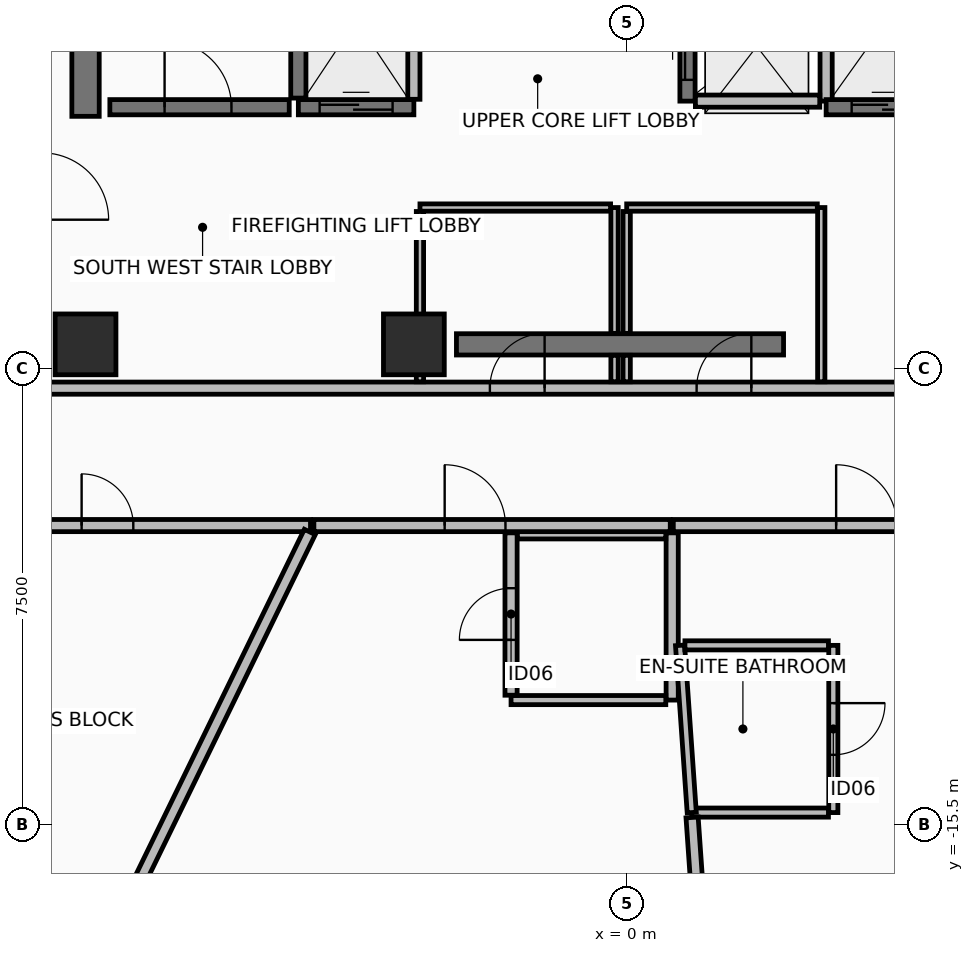
"""IFC4 building model, lengths in metres.
Left out: names, types, materials, properties, quantities, classifications, styles, units other than length and angle.
Written with IfcOpenShell. Run it as: python <this file> out.ifc"""

import sys

from ifc_helpers import new_model, si_unit, direction, frame, frame_2d, origin, origin_2d, place, context, subcontext, project, spatial, rectangle, extrude, element, fill, save


model = new_model("IFC4")
c1 = context("Model", 3, precision=1e-05, world=origin(), true_north=direction((0.0, 1.0)))
c2 = subcontext(c1, "Body", "Model", "MODEL_VIEW")
j1 = project(units=[si_unit("LENGTHUNIT", "METRE"), si_unit("PLANEANGLEUNIT", "RADIAN")], contexts=[c1])
p1 = place(None, origin())
s1 = spatial("IfcSite", under=j1, at=p1, CompositionType="ELEMENT")
p2 = place(p1, origin())
s2 = spatial("IfcBuilding", under=s1, at=p2, CompositionType="ELEMENT")
p3 = place(p2, frame((0.0, 0.0, 287.05)))
s3 = spatial("IfcBuildingStorey", under=s2, at=p3, CompositionType="ELEMENT", Elevation=287.05)
for number, where, z_axis, x_axis in (
    (1, (-8.9, -7.6, 0.0), (0.0, 0.0, 1.0), (1.0, 0.0, 0.0)),
    (2, (-3.5, -7.6, 0.0), (0.0, 0.0, 1.0), (1.0, 0.0, 0.0)),
):
    element("IfcColumn", number, at=place(p3, frame(where, z_axis=z_axis, x_axis=x_axis)), inside=s3, PredefinedType="COLUMN", context=c2, shape_type="SweptSolid", body=[
        extrude(rectangle(XDim=1.0, YDim=1.0, at=origin_2d()), origin(), (0.0, 0.0, 1.0), 3.65),
    ])
p4 = place(p3, frame((-2.8, -7.6, 0.0), z_axis=(0.0, 0.0, 1.0), x_axis=(1.0, 0.0, 0.0)))
e3 = element("IfcWall", 3, at=p4, inside=s3, PredefinedType="SHEAR", context=c2, shape_type="SweptSolid", body=[
    extrude(rectangle(XDim=5.38, YDim=0.35, at=frame_2d((2.69, 0.0))), origin(), (0.0, 0.0, 1.0), 3.465),
])
p5 = place(p3, frame((-8.9, -3.85, 0.0), z_axis=(0.0, 0.0, 1.0), x_axis=(0.0, 1.0, 0.0)))
e4 = element("IfcWall", 4, at=p5, inside=s3, PredefinedType="SHEAR", context=c2, shape_type="SweptSolid", body=[
    extrude(rectangle(XDim=10.7, YDim=0.45, at=frame_2d((5.35, 0.0))), origin(), (0.0, 0.0, 1.0), 3.465),
])
p6 = place(p3, frame((-9.62, -8.32, 0.0), z_axis=(0.0, 0.0, 1.0), x_axis=(1.0, 0.0, 0.0)))
e5 = element("IfcWall", 5, at=p6, inside=s3, PredefinedType="PARTITIONING", context=c2, shape_type="SweptSolid", body=[
    extrude(rectangle(XDim=19.24, YDim=0.2, at=frame_2d((9.62, 0.0))), origin(), (0.0, 0.0, 1.0), 2.96),
])
p7 = place(p6, frame((7.37, 0.0, 0.0)))
e6 = element("IfcOpeningElement", 6, at=p7, cuts=e5, PredefinedType="OPENING", context=c2, shape_type="SweptSolid", body=[
    extrude(rectangle(XDim=0.9, YDim=2.1, at=frame_2d((0.45, 1.05))), frame((0.0, 0.11, 0.0), z_axis=(0.0, -1.0, 0.0), x_axis=(1.0, 0.0, 0.0)), (0.0, 0.0, 1.0), 0.22),
])
p8 = place(p6, frame((10.77, 0.0, 0.0)))
e7 = element("IfcOpeningElement", 7, at=p8, cuts=e5, PredefinedType="OPENING", context=c2, shape_type="SweptSolid", body=[
    extrude(rectangle(XDim=0.9, YDim=2.1, at=frame_2d((0.45, 1.05))), frame((0.0, 0.11, 0.0), z_axis=(0.0, -1.0, 0.0), x_axis=(1.0, 0.0, 0.0)), (0.0, 0.0, 1.0), 0.22),
])
p9 = place(p3, frame((-5.4, -3.55, 0.0), z_axis=(0.0, 0.0, 1.0), x_axis=(0.0, 1.0, 0.0)))
e8 = element("IfcWall", 8, at=p9, inside=s3, PredefinedType="SHEAR", context=c2, shape_type="SweptSolid", body=[
    extrude(rectangle(XDim=7.3, YDim=0.25, at=frame_2d((3.65, 0.0))), origin(), (0.0, 0.0, 1.0), 3.465),
])
p10 = place(p3, frame((-8.5, -3.7, 0.0), z_axis=(0.0, 0.0, 1.0), x_axis=(1.0, 0.0, 0.0)))
e9 = element("IfcWall", 9, at=p10, inside=s3, PredefinedType="SHEAR", context=c2, shape_type="SweptSolid", body=[
    extrude(rectangle(XDim=2.95, YDim=0.25, at=frame_2d((1.475, 0.0))), origin(), (0.0, 0.0, 1.0), 3.465),
])
p11 = place(p10, frame((0.9, 0.0, 0.0)))
e10 = element("IfcOpeningElement", 10, at=p11, cuts=e9, PredefinedType="OPENING", context=c2, shape_type="SweptSolid", body=[
    extrude(rectangle(XDim=1.1, YDim=2.15, at=frame_2d((0.55, 1.075))), frame((0.0, 0.135, 0.0), z_axis=(0.0, -1.0, 0.0), x_axis=(1.0, 0.0, 0.0)), (0.0, 0.0, 1.0), 0.27),
])
p12 = place(p3, frame((1.0, -3.6, 0.0), z_axis=(0.0, 0.0, 1.0), x_axis=(0.0, 1.0, 0.0)))
e11 = element("IfcWall", 11, at=p12, inside=s3, PredefinedType="SHEAR", context=c2, shape_type="SweptSolid", body=[
    extrude(rectangle(XDim=1.8, YDim=0.25, at=frame_2d((0.9, 0.0))), origin(), (0.0, 0.0, 1.0), 3.465),
])
p13 = place(p12, frame((0.35, 0.0, 0.0)))
e12 = element("IfcOpeningElement", 12, at=p13, cuts=e11, PredefinedType="OPENING", context=c2, shape_type="SweptSolid", body=[
    extrude(rectangle(XDim=1.1, YDim=2.2, at=frame_2d((0.55, 1.1))), frame((0.0, 0.135, 0.0), z_axis=(0.0, -1.0, 0.0), x_axis=(1.0, 0.0, 0.0)), (0.0, 0.0, 1.0), 0.27),
])
p14 = place(p3, frame((3.28, -3.6, 0.0), z_axis=(0.0, 0.0, 1.0), x_axis=(0.0, 1.0, 0.0)))
e13 = element("IfcWall", 13, at=p14, inside=s3, PredefinedType="PARTITIONING", context=c2, shape_type="SweptSolid", body=[
    extrude(rectangle(XDim=1.8, YDim=0.2, at=frame_2d((0.9, 0.0))), origin(), (0.0, 0.0, 1.0), 3.465),
])
p15 = place(p3, frame((1.13, -3.6, 0.0), z_axis=(0.0, 0.0, 1.0), x_axis=(1.0, 0.0, 0.0)))
e14 = element("IfcWall", 14, at=p15, inside=s3, PredefinedType="PARTITIONING", context=c2, shape_type="SweptSolid", body=[
    extrude(rectangle(XDim=2.045, YDim=0.2, at=frame_2d((1.022, 0.0))), origin(), (0.0, 0.0, 1.0), 3.465),
])
p16 = place(p3, frame((-5.4, -3.7, 0.0), z_axis=(0.0, 0.0, 1.0), x_axis=(1.0, 0.0, 0.0)))
e15 = element("IfcWall", 15, at=p16, inside=s3, PredefinedType="SHEAR", context=c2, shape_type="SweptSolid", body=[
    extrude(rectangle(XDim=1.9, YDim=0.25, at=frame_2d((0.95, 0.0))), origin(), (0.0, 0.0, 1.0), 3.465),
])
p17 = place(p16, frame((0.35, 0.0, 0.0)))
e16 = element("IfcOpeningElement", 16, at=p17, cuts=e15, PredefinedType="OPENING", context=c2, shape_type="SweptSolid", body=[
    extrude(rectangle(XDim=1.2, YDim=2.2, at=frame_2d((0.6, 1.1))), frame((0.0, 0.135, 0.0), z_axis=(0.0, -1.0, 0.0), x_axis=(1.0, 0.0, 0.0)), (0.0, 0.0, 1.0), 0.27),
])
p18 = place(p3, frame((-3.5, -3.57, 0.0), z_axis=(0.0, 0.0, 1.0), x_axis=(0.0, 1.0, 0.0)))
e17 = element("IfcWall", 17, at=p18, inside=s3, PredefinedType="PARTITIONING", context=c2, shape_type="SweptSolid", body=[
    extrude(rectangle(XDim=2.615, YDim=0.2, at=frame_2d((1.308, 0.0))), origin(), (0.0, 0.0, 1.0), 3.465),
])
p19 = place(p3, frame((3.28, -3.7, 0.0), z_axis=(0.0, 0.0, 1.0), x_axis=(1.0, 0.0, 0.0)))
e18 = element("IfcWall", 18, at=p19, inside=s3, PredefinedType="SHEAR", context=c2, shape_type="SweptSolid", body=[
    extrude(rectangle(XDim=1.94, YDim=0.25, at=frame_2d((0.97, 0.0))), origin(), (0.0, 0.0, 1.0), 3.465),
])
p20 = place(p19, frame((0.42, 0.0, 0.0)))
e19 = element("IfcOpeningElement", 19, at=p20, cuts=e18, PredefinedType="OPENING", context=c2, shape_type="SweptSolid", body=[
    extrude(rectangle(XDim=1.1, YDim=2.2, at=frame_2d((0.55, 1.1))), frame((0.0, 0.135, 0.0), z_axis=(0.0, -1.0, 0.0), x_axis=(1.0, 0.0, 0.0)), (0.0, 0.0, 1.0), 0.27),
])
p21 = place(p3, frame((-0.2, -8.215, 0.0), z_axis=(0.0, 0.0, 1.0), x_axis=(0.0, 1.0, 0.0)))
e20 = element("IfcWall", 20, at=p21, inside=s3, PredefinedType="PARTITIONING", context=c2, shape_type="SweptSolid", body=[
    extrude(rectangle(XDim=0.435, YDim=0.12, at=frame_2d((0.218, 0.0))), origin(), (0.0, 0.0, 1.0), 2.76),
])
p22 = place(p3, frame((-0.2, -7.42, 0.0), z_axis=(0.0, 0.0, 1.0), x_axis=(0.0, 1.0, 0.0)))
e21 = element("IfcWall", 21, at=p22, inside=s3, PredefinedType="PARTITIONING", context=c2, shape_type="SweptSolid", body=[
    extrude(rectangle(XDim=2.07, YDim=0.12, at=frame_2d((1.035, 0.0))), origin(), (0.0, 0.0, 1.0), 2.76),
])
p23 = place(p3, frame((-0.265, -5.35, 0.0), z_axis=(0.0, 0.0, 1.0), x_axis=(-1.0, 0.0, 0.0)))
e22 = element("IfcWall", 22, at=p23, inside=s3, PredefinedType="PARTITIONING", context=c2, shape_type="SweptSolid", body=[
    extrude(rectangle(XDim=3.135, YDim=0.12, at=frame_2d((1.567, 0.0))), origin(), (0.0, 0.0, 1.0), 2.76),
])
p24 = place(p3, frame((-3.4, -5.415, 0.0), z_axis=(0.0, 0.0, 1.0), x_axis=(0.0, -1.0, 0.0)))
e23 = element("IfcWall", 23, at=p24, inside=s3, PredefinedType="PARTITIONING", context=c2, shape_type="SweptSolid", body=[
    extrude(rectangle(XDim=2.8, YDim=0.12, at=frame_2d((1.4, 0.0))), origin(), (0.0, 0.0, 1.0), 2.76),
])
p25 = place(p3, frame((3.2, -8.215, 0.0), z_axis=(0.0, 0.0, 1.0), x_axis=(0.0, 1.0, 0.0)))
e24 = element("IfcWall", 24, at=p25, inside=s3, PredefinedType="PARTITIONING", context=c2, shape_type="SweptSolid", body=[
    extrude(rectangle(XDim=2.865, YDim=0.12, at=frame_2d((1.433, 0.0))), origin(), (0.0, 0.0, 1.0), 2.76),
])
p26 = place(p3, frame((3.135, -5.35, 0.0), z_axis=(0.0, 0.0, 1.0), x_axis=(-1.0, 0.0, 0.0)))
e25 = element("IfcWall", 25, at=p26, inside=s3, PredefinedType="PARTITIONING", context=c2, shape_type="SweptSolid", body=[
    extrude(rectangle(XDim=3.135, YDim=0.12, at=frame_2d((1.567, 0.0))), origin(), (0.0, 0.0, 1.0), 3.465),
])
p27 = place(p3, frame((0.0, -5.415, 0.0), z_axis=(0.0, 0.0, 1.0), x_axis=(0.0, -1.0, 0.0)))
e26 = element("IfcWall", 26, at=p27, inside=s3, PredefinedType="PARTITIONING", context=c2, shape_type="SweptSolid", body=[
    extrude(rectangle(XDim=2.005, YDim=0.12, at=frame_2d((1.002, 0.0))), origin(), (0.0, 0.0, 1.0), 2.76),
])
p28 = place(p3, frame((0.0, -7.78, 0.0), z_axis=(0.0, 0.0, 1.0), x_axis=(0.0, -1.0, 0.0)))
e27 = element("IfcWall", 27, at=p28, inside=s3, PredefinedType="PARTITIONING", context=c2, shape_type="SweptSolid", body=[
    extrude(rectangle(XDim=0.435, YDim=0.12, at=frame_2d((0.218, 0.0))), origin(), (0.0, 0.0, 1.0), 2.76),
])
p29 = place(p3, frame((0.748, -10.7, 0.0), z_axis=(0.0, 0.0, 1.0), x_axis=(0.0, -1.0, 0.0)))
e28 = element("IfcWall", 28, at=p29, inside=s3, PredefinedType="PARTITIONING", context=c2, shape_type="SweptSolid", body=[
    extrude(rectangle(XDim=2.75, YDim=0.2, at=frame_2d((1.375, 0.0))), origin(), (0.0, 0.0, 1.0), 3.465),
])
p30 = place(p3, frame((0.643, -13.45, 0.0), z_axis=(0.0, 0.0, 1.0), x_axis=(-1.0, 0.0, 0.0)))
e29 = element("IfcWall", 29, at=p30, inside=s3, PredefinedType="PARTITIONING", context=c2, shape_type="SweptSolid", body=[
    extrude(rectangle(XDim=2.545, YDim=0.15, at=frame_2d((1.272, 0.0))), origin(), (0.0, 0.0, 1.0), 3.465),
])
p31 = place(p3, frame((-1.902, -13.37, 0.0), z_axis=(0.0, 0.0, 1.0), x_axis=(0.0, 1.0, 0.0)))
e30 = element("IfcWall", 30, at=p31, inside=s3, PredefinedType="PARTITIONING", context=c2, shape_type="SweptSolid", body=[
    extrude(rectangle(XDim=2.67, YDim=0.2, at=frame_2d((1.335, 0.0))), origin(), (0.0, 0.0, 1.0), 3.465),
])
p32 = place(p31, frame((0.91, 0.0, 0.0)))
e31 = element("IfcOpeningElement", 31, at=p32, cuts=e30, PredefinedType="OPENING", context=c2, shape_type="SweptSolid", body=[
    extrude(rectangle(XDim=0.85, YDim=2.1, at=frame_2d((0.425, 1.05))), frame((0.0, 0.11, 0.0), z_axis=(0.0, -1.0, 0.0), x_axis=(1.0, 0.0, 0.0)), (0.0, 0.0, 1.0), 0.22),
])
p33 = place(p3, frame((-1.797, -10.7, 0.0), z_axis=(0.0, 0.0, 1.0), x_axis=(1.0, 0.0, 0.0)))
e32 = element("IfcWall", 32, at=p33, inside=s3, PredefinedType="PARTITIONING", context=c2, shape_type="SweptSolid", body=[
    extrude(rectangle(XDim=2.44, YDim=0.2, at=frame_2d((1.22, 0.0))), origin(), (0.0, 0.0, 1.0), 3.465),
])
p34 = place(p3, frame((3.398, -12.55, 0.0), z_axis=(0.0, 0.0, 1.0), x_axis=(0.0, -1.0, 0.0)))
e33 = element("IfcWall", 33, at=p34, inside=s3, PredefinedType="PARTITIONING", context=c2, shape_type="SweptSolid", body=[
    extrude(rectangle(XDim=2.75, YDim=0.15, at=frame_2d((1.375, 0.0))), origin(), (0.0, 0.0, 1.0), 3.465),
])
p35 = place(p34, frame((0.95, 0.0, 0.0)))
e34 = element("IfcOpeningElement", 34, at=p35, cuts=e33, PredefinedType="OPENING", context=c2, shape_type="SweptSolid", body=[
    extrude(rectangle(XDim=0.85, YDim=2.1, at=frame_2d((0.425, 1.05))), frame((0.0, 0.085, 0.0), z_axis=(0.0, -1.0, 0.0), x_axis=(1.0, 0.0, 0.0)), (0.0, 0.0, 1.0), 0.17),
])
p36 = place(p3, frame((3.318, -15.3, 0.0), z_axis=(0.0, 0.0, 1.0), x_axis=(-1.0, 0.0, 0.0)))
e35 = element("IfcWall", 35, at=p36, inside=s3, PredefinedType="PARTITIONING", context=c2, shape_type="SweptSolid", body=[
    extrude(rectangle(XDim=2.248, YDim=0.15, at=frame_2d((1.124, 0.0))), origin(), (0.0, 0.0, 1.0), 3.465),
])
p37 = place(p3, frame((1.07, -15.3, 0.0), z_axis=(0.0, 0.0, 1.0), x_axis=(-0.069698693715, 0.997568088952, 0.0)))
e36 = element("IfcWall", 36, at=p37, inside=s3, PredefinedType="PARTITIONING", context=c2, shape_type="SweptSolid", body=[
    extrude(rectangle(XDim=2.757, YDim=0.15, at=frame_2d((1.378, 0.0))), origin(), (0.0, 0.0, 1.0), 3.465),
])
p38 = place(p3, frame((0.958, -12.55, 0.0), z_axis=(0.0, 0.0, 1.0), x_axis=(1.0, 0.0, 0.0)))
e37 = element("IfcWall", 37, at=p38, inside=s3, PredefinedType="PARTITIONING", context=c2, shape_type="SweptSolid", body=[
    extrude(rectangle(XDim=2.36, YDim=0.15, at=frame_2d((1.18, 0.0))), origin(), (0.0, 0.0, 1.0), 3.465),
])
p39 = place(p3, frame((-11.879, -10.58, 0.0), z_axis=(0.0, 0.0, 1.0), x_axis=(1.0, 0.0, 0.0)))
e38 = element("IfcWall", 38, at=p39, inside=s3, PredefinedType="PARTITIONING", context=c2, shape_type="SweptSolid", body=[
    extrude(rectangle(XDim=6.679, YDim=0.2, at=frame_2d((3.34, 0.0))), origin(), (0.0, 0.0, 1.0), 3.22),
])
p40 = place(p39, frame((2.915, 0.0, 0.0)))
e39 = element("IfcOpeningElement", 39, at=p40, cuts=e38, PredefinedType="OPENING", context=c2, shape_type="SweptSolid", body=[
    extrude(rectangle(XDim=0.85, YDim=2.1, at=frame_2d((0.425, 1.05))), frame((0.0, 0.11, 0.0), z_axis=(0.0, -1.0, 0.0), x_axis=(1.0, 0.0, 0.0)), (0.0, 0.0, 1.0), 0.22),
])
p41 = place(p3, frame((-5.211, -10.685, 0.0), z_axis=(0.0, 0.0, 1.0), x_axis=(-0.438373396373, -0.8987929491, 0.0)))
e40 = element("IfcWall", 40, at=p41, inside=s3, PredefinedType="PARTITIONING", context=c2, shape_type="SweptSolid", body=[
    extrude(rectangle(XDim=9.479, YDim=0.2, at=frame_2d((4.74, 0.0))), origin(), (0.0, 0.0, 1.0), 2.81),
])
p42 = place(p3, frame((-9.443, -19.121, 0.0), z_axis=(0.0, 0.0, 1.0), x_axis=(-0.669126879752, 0.743148180912, 0.0)))
e41 = element("IfcWall", 41, at=p42, inside=s3, PredefinedType="PARTITIONING", context=c2, shape_type="SweptSolid", body=[
    extrude(rectangle(XDim=10.647, YDim=0.15, at=frame_2d((5.323, 0.0))), origin(), (0.0, 0.0, 1.0), 3.465),
])
p43 = place(p3, frame((-5.145, -10.58, 0.0), z_axis=(0.0, 0.0, 1.0), x_axis=(1.0, 0.0, 0.0)))
e42 = element("IfcWall", 42, at=p43, inside=s3, PredefinedType="PARTITIONING", context=c2, shape_type="SweptSolid", body=[
    extrude(rectangle(XDim=5.861, YDim=0.2, at=frame_2d((2.931, 0.0))), origin(), (0.0, 0.0, 1.0), 2.96),
])
p44 = place(p43, frame((2.151, 0.0, 0.0)))
e43 = element("IfcOpeningElement", 43, at=p44, cuts=e42, PredefinedType="OPENING", context=c2, shape_type="SweptSolid", body=[
    extrude(rectangle(XDim=1.0, YDim=2.15, at=frame_2d((0.5, 1.075))), frame((0.0, 0.11, 0.0), z_axis=(0.0, -1.0, 0.0), x_axis=(1.0, 0.0, 0.0)), (0.0, 0.0, 1.0), 0.22),
])
p45 = place(p3, frame((1.075, -15.38, 0.0), z_axis=(0.0, 0.0, 1.0), x_axis=(0.069765789378, -0.997563398804, 0.0)))
e44 = element("IfcWall", 44, at=p45, inside=s3, PredefinedType="PARTITIONING", context=c2, shape_type="SweptSolid", body=[
    extrude(rectangle(XDim=16.762, YDim=0.2, at=frame_2d((8.381, 0.0))), origin(), (0.0, 0.0, 1.0), 2.81),
])
p46 = place(p3, frame((0.767, -10.58, 0.0), z_axis=(0.0, 0.0, 1.0), x_axis=(1.0, 0.0, 0.0)))
e45 = element("IfcWall", 45, at=p46, inside=s3, PredefinedType="PARTITIONING", context=c2, shape_type="SweptSolid", body=[
    extrude(rectangle(XDim=6.356, YDim=0.2, at=frame_2d((3.178, 0.0))), origin(), (0.0, 0.0, 1.0), 3.465),
])
p47 = place(p46, frame((2.678, 0.0, 0.0)))
e46 = element("IfcOpeningElement", 46, at=p47, cuts=e45, PredefinedType="OPENING", context=c2, shape_type="SweptSolid", body=[
    extrude(rectangle(XDim=1.0, YDim=2.15, at=frame_2d((0.5, 1.075))), frame((0.0, 0.11, 0.0), z_axis=(0.0, -1.0, 0.0), x_axis=(1.0, 0.0, 0.0)), (0.0, 0.0, 1.0), 0.22),
])
p48 = place(p11, origin())
e47 = element("IfcDoor", 47, at=p48, inside=s3, OperationType="SINGLE_SWING_LEFT", PredefinedType="DOOR", context=c2, shape_type="SweptSolid", body=[
    extrude(rectangle(XDim=1.1, YDim=2.15, at=frame_2d((0.55, 1.075))), frame((0.0, 0.025, 0.0), z_axis=(0.0, -1.0, 0.0), x_axis=(1.0, 0.0, 0.0)), (0.0, 0.0, 1.0), 0.05),
])
fill(e10, e47)
p49 = place(p13, origin())
e48 = element("IfcDoor", 48, at=p49, inside=s3, OperationType="SLIDING_TO_LEFT", PredefinedType="DOOR", context=c2, shape_type="SweptSolid", body=[
    extrude(rectangle(XDim=1.1, YDim=2.2, at=frame_2d((0.55, 1.1))), frame((0.0, 0.025, 0.0), z_axis=(0.0, -1.0, 0.0), x_axis=(1.0, 0.0, 0.0)), (0.0, 0.0, 1.0), 0.05),
])
fill(e12, e48)
p50 = place(p17, origin())
e49 = element("IfcDoor", 49, at=p50, inside=s3, OperationType="SLIDING_TO_RIGHT", PredefinedType="DOOR", context=c2, shape_type="SweptSolid", body=[
    extrude(rectangle(XDim=1.2, YDim=2.2, at=frame_2d((0.6, 1.1))), frame((0.0, 0.025, 0.0), z_axis=(0.0, -1.0, 0.0), x_axis=(1.0, 0.0, 0.0)), (0.0, 0.0, 1.0), 0.05),
])
fill(e16, e49)
p51 = place(p20, origin())
e50 = element("IfcDoor", 50, at=p51, inside=s3, OperationType="SLIDING_TO_LEFT", PredefinedType="DOOR", context=c2, shape_type="SweptSolid", body=[
    extrude(rectangle(XDim=1.1, YDim=2.2, at=frame_2d((0.55, 1.1))), frame((0.0, 0.025, 0.0), z_axis=(0.0, -1.0, 0.0), x_axis=(1.0, 0.0, 0.0)), (0.0, 0.0, 1.0), 0.05),
])
fill(e19, e50)
p52 = place(p7, frame((0.9, 0.0, 0.0), z_axis=(0.0, 0.0, 1.0), x_axis=(-1.0, 0.0, 0.0)))
e51 = element("IfcDoor", 51, at=p52, inside=s3, OperationType="SINGLE_SWING_LEFT", PredefinedType="DOOR", context=c2, shape_type="SweptSolid", body=[
    extrude(rectangle(XDim=0.9, YDim=2.1, at=frame_2d((0.45, 1.05))), frame((0.0, 0.025, 0.0), z_axis=(0.0, -1.0, 0.0), x_axis=(1.0, 0.0, 0.0)), (0.0, 0.0, 1.0), 0.05),
])
fill(e6, e51)
p53 = place(p8, frame((0.9, 0.0, 0.0), z_axis=(0.0, 0.0, 1.0), x_axis=(-1.0, 0.0, 0.0)))
e52 = element("IfcDoor", 52, at=p53, inside=s3, OperationType="SINGLE_SWING_LEFT", PredefinedType="DOOR", context=c2, shape_type="SweptSolid", body=[
    extrude(rectangle(XDim=0.9, YDim=2.1, at=frame_2d((0.45, 1.05))), frame((0.0, 0.025, 0.0), z_axis=(0.0, -1.0, 0.0), x_axis=(1.0, 0.0, 0.0)), (0.0, 0.0, 1.0), 0.05),
])
fill(e7, e52)
p54 = place(p32, origin())
e53 = element("IfcDoor", 53, at=p54, inside=s3, OperationType="SINGLE_SWING_RIGHT", PredefinedType="DOOR", context=c2, shape_type="SweptSolid", body=[
    extrude(rectangle(XDim=0.85, YDim=2.1, at=frame_2d((0.425, 1.05))), frame((0.0, 0.025, 0.0), z_axis=(0.0, -1.0, 0.0), x_axis=(1.0, 0.0, 0.0)), (0.0, 0.0, 1.0), 0.05),
])
fill(e31, e53)
p55 = place(p35, origin())
e54 = element("IfcDoor", 54, at=p55, inside=s3, OperationType="SINGLE_SWING_RIGHT", PredefinedType="DOOR", context=c2, shape_type="SweptSolid", body=[
    extrude(rectangle(XDim=0.85, YDim=2.1, at=frame_2d((0.425, 1.05))), frame((0.0, 0.025, 0.0), z_axis=(0.0, -1.0, 0.0), x_axis=(1.0, 0.0, 0.0)), (0.0, 0.0, 1.0), 0.05),
])
fill(e34, e54)
p56 = place(p40, origin())
e55 = element("IfcDoor", 55, at=p56, inside=s3, OperationType="SINGLE_SWING_RIGHT", PredefinedType="DOOR", context=c2, shape_type="SweptSolid", body=[
    extrude(rectangle(XDim=0.85, YDim=2.1, at=frame_2d((0.425, 1.05))), frame((0.0, 0.025, 0.0), z_axis=(0.0, -1.0, 0.0), x_axis=(1.0, 0.0, 0.0)), (0.0, 0.0, 1.0), 0.05),
])
fill(e39, e55)
p57 = place(p44, origin())
e56 = element("IfcDoor", 56, at=p57, inside=s3, OperationType="SINGLE_SWING_LEFT", PredefinedType="DOOR", context=c2, shape_type="SweptSolid", body=[
    extrude(rectangle(XDim=1.0, YDim=2.15, at=frame_2d((0.5, 1.075))), frame((0.0, 0.025, 0.0), z_axis=(0.0, -1.0, 0.0), x_axis=(1.0, 0.0, 0.0)), (0.0, 0.0, 1.0), 0.05),
])
fill(e43, e56)
p58 = place(p47, origin())
e57 = element("IfcDoor", 57, at=p58, inside=s3, OperationType="SINGLE_SWING_LEFT", PredefinedType="DOOR", context=c2, shape_type="SweptSolid", body=[
    extrude(rectangle(XDim=1.0, YDim=2.15, at=frame_2d((0.5, 1.075))), frame((0.0, 0.025, 0.0), z_axis=(0.0, -1.0, 0.0), x_axis=(1.0, 0.0, 0.0)), (0.0, 0.0, 1.0), 0.05),
])
fill(e46, e57)
save(model, sys.argv[1])
